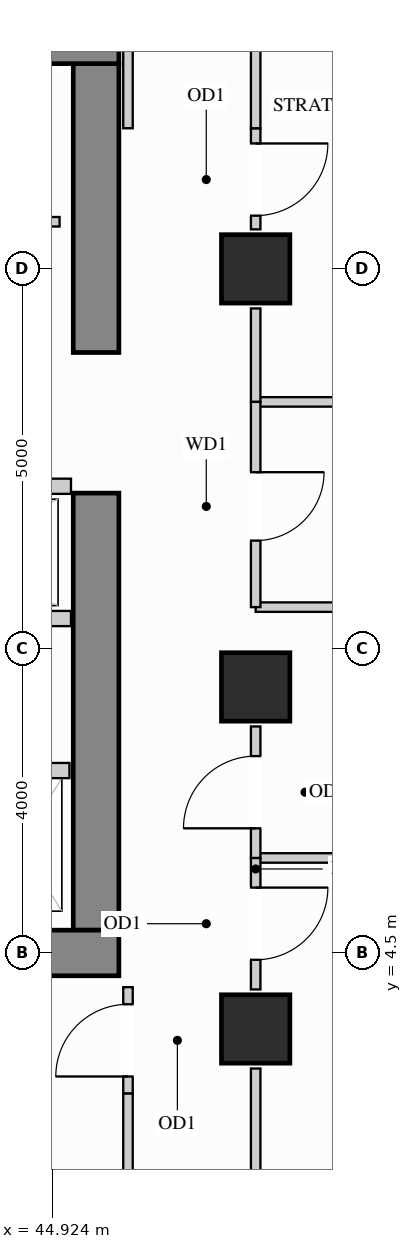
"""IFC4 building model, lengths in metres.
Left out: names, types, materials, properties, quantities, classifications, styles, units other than length and angle.
Written with IfcOpenShell. Run it as: python <this file> out.ifc"""

import sys

from ifc_helpers import new_model, si_unit, direction, frame, frame_2d, origin, origin_2d, place, context, subcontext, project, spatial, rectangle, extrude, source, transform, mapped, element, fill, save


model = new_model("IFC4")
c1 = context("Model", 3, precision=1e-05, world=origin(), true_north=direction((0.0, 1.0)))
c2 = subcontext(c1, "Body", "Model", "MODEL_VIEW")
j1 = project(units=[si_unit("LENGTHUNIT", "METRE"), si_unit("PLANEANGLEUNIT", "RADIAN")], contexts=[c1])
p1 = place(None, origin())
s1 = spatial("IfcSite", under=j1, at=p1, CompositionType="ELEMENT")
p2 = place(p1, origin())
s2 = spatial("IfcBuilding", under=s1, at=p2, CompositionType="ELEMENT")
p3 = place(p2, frame((0.0, 0.0, 179.1)))
s3 = spatial("IfcBuildingStorey", under=s2, at=p3, CompositionType="ELEMENT", Elevation=179.1)
m1 = source(origin(), c2, "Body", "SweptSolid", [
    extrude(rectangle(XDim=0.9, YDim=0.9, at=origin_2d()), origin(), (0.0, 0.0, 1.0), 3.4),
])
for number, where, z_axis, x_axis in (
    (1, (47.6, 13.5, 0.0), (0.0, 0.0, 1.0), (1.0, 0.0, 0.0)),
    (2, (47.6, 3.5, 0.0), (0.0, 0.0, 1.0), (1.0, 0.0, 0.0)),
    (3, (47.6, 8.0, 0.0), (0.0, 0.0, 1.0), (1.0, 0.0, 0.0)),
):
    element("IfcColumn", number, at=place(p3, frame(where, z_axis=z_axis, x_axis=x_axis)), inside=s3, PredefinedType="COLUMN", context=c2, shape_type="MappedRepresentation", body=[
        mapped(m1, transform((0.0, 0.0, 0.0), x_axis=(1.0, 0.0, 0.0), y_axis=(0.0, 1.0, 0.0), z_axis=(0.0, 0.0, 1.0))),
    ])
m2 = source(origin(), c2, "Body", "SweptSolid", [
    extrude(rectangle(XDim=5.75, YDim=0.6, at=frame_2d((2.875, 0.0))), origin(), (0.0, 0.0, 1.0), 3.4),
])
p4 = place(p3, frame((45.5, 4.8, 0.0), z_axis=(0.0, 0.0, 1.0), x_axis=(0.0, 1.0, 0.0)))
e4 = element("IfcWall", 4, at=p4, inside=s3, PredefinedType="SHEAR", context=c2, shape_type="MappedRepresentation", body=[
    mapped(m2, transform((0.0, 0.0, 0.0), x_axis=(1.0, 0.0, 0.0), y_axis=(0.0, 1.0, 0.0), z_axis=(0.0, 0.0, 1.0))),
])
m3 = source(origin(), c2, "Body", "SweptSolid", [
    extrude(rectangle(XDim=3.8, YDim=0.6, at=frame_2d((1.9, 0.0))), origin(), (0.0, 0.0, 1.0), 3.4),
])
p5 = place(p3, frame((45.5, 12.4, 0.0), z_axis=(0.0, 0.0, 1.0), x_axis=(0.0, 1.0, 0.0)))
e5 = element("IfcWall", 5, at=p5, inside=s3, PredefinedType="SHEAR", context=c2, shape_type="MappedRepresentation", body=[
    mapped(m3, transform((0.0, 0.0, 0.0), x_axis=(1.0, 0.0, 0.0), y_axis=(0.0, 1.0, 0.0), z_axis=(0.0, 0.0, 1.0))),
])
m4 = source(origin(), c2, "Body", "SweptSolid", [
    extrude(rectangle(XDim=10.1, YDim=0.6, at=frame_2d((5.05, 0.0))), origin(), (0.0, 0.0, 1.0), 3.4),
])
for number, where, z_axis, x_axis in (
    (6, (35.7, 16.5, 0.0), (0.0, 0.0, 1.0), (1.0, 0.0, 0.0)),
    (7, (35.7, 4.5, 0.0), (0.0, 0.0, 1.0), (1.0, 0.0, 0.0)),
):
    element("IfcWall", number, at=place(p3, frame(where, z_axis=z_axis, x_axis=x_axis)), inside=s3, PredefinedType="SHEAR", context=c2, shape_type="MappedRepresentation", body=[
        mapped(m4, transform((0.0, 0.0, 0.0), x_axis=(1.0, 0.0, 0.0), y_axis=(0.0, 1.0, 0.0), z_axis=(0.0, 0.0, 1.0))),
    ])
p6 = place(p3, frame((36.5, 14.12, 0.0), z_axis=(0.0, 0.0, 1.0), x_axis=(1.0, 0.0, 0.0)))
e8 = element("IfcWall", 8, at=p6, inside=s3, PredefinedType="PARTITIONING", context=c2, shape_type="SweptSolid", body=[
    extrude(rectangle(XDim=8.52, YDim=0.125, at=frame_2d((4.26, 0.0))), origin(), (0.0, 0.0, 1.0), 3.385),
])
p7 = place(p6, frame((3.785, 0.0, 0.0)))
e9 = element("IfcOpeningElement", 9, at=p7, cuts=e8, PredefinedType="OPENING", context=c2, shape_type="SweptSolid", body=[
    extrude(rectangle(XDim=0.95, YDim=2.15, at=frame_2d((0.475, 1.075))), frame((0.0, 0.073, 0.0), z_axis=(0.0, -1.0, 0.0), x_axis=(1.0, 0.0, 0.0)), (0.0, 0.0, 1.0), 0.145),
])
m5 = source(origin(), c2, "Body", "SweptSolid", [
    extrude(rectangle(XDim=5.048, YDim=0.125, at=frame_2d((2.524, 0.0))), origin(), (0.0, 0.0, 1.0), 2.916),
])
p8 = place(p3, frame((47.6, 11.75, 0.0), z_axis=(0.0, 0.0, 1.0), x_axis=(1.0, 0.0, 0.0)))
e10 = element("IfcWall", 10, at=p8, inside=s3, PredefinedType="PARTITIONING", context=c2, shape_type="MappedRepresentation", body=[
    mapped(m5, transform((0.0, 0.0, 0.0), x_axis=(1.0, 0.0, 0.0), y_axis=(0.0, 1.0, 0.0), z_axis=(0.0, 0.0, 1.0))),
])
m6 = source(origin(), c2, "Body", "SweptSolid", [
    extrude(rectangle(XDim=5.048, YDim=0.125, at=frame_2d((2.524, 0.0))), origin(), (0.0, 0.0, 1.0), 3.385),
])
for number, where, z_axis, x_axis in (
    (11, (47.6, 5.75, 0.0), (0.0, 0.0, 1.0), (1.0, 0.0, 0.0)),
    (12, (47.6, 9.05, 0.0), (0.0, 0.0, 1.0), (1.0, 0.0, 0.0)),
):
    element("IfcWall", number, at=place(p3, frame(where, z_axis=z_axis, x_axis=x_axis)), inside=s3, PredefinedType="PARTITIONING", context=c2, shape_type="MappedRepresentation", body=[
        mapped(m6, transform((0.0, 0.0, 0.0), x_axis=(1.0, 0.0, 0.0), y_axis=(0.0, 1.0, 0.0), z_axis=(0.0, 0.0, 1.0))),
    ])
p9 = place(p3, frame((47.6, 4.02, 0.0), z_axis=(0.0, 0.0, 1.0), x_axis=(0.0, 1.0, 0.0)))
e13 = element("IfcWall", 13, at=p9, inside=s3, PredefinedType="PARTITIONING", context=c2, shape_type="SweptSolid", body=[
    extrude(rectangle(XDim=1.73, YDim=0.125, at=frame_2d((0.865, 0.0))), origin(), (0.0, 0.0, 1.0), 2.773),
])
p10 = place(p9, frame((0.39, 0.0, 0.0)))
e14 = element("IfcOpeningElement", 14, at=p10, cuts=e13, PredefinedType="OPENING", context=c2, shape_type="SweptSolid", body=[
    extrude(rectangle(XDim=0.95, YDim=2.15, at=frame_2d((0.475, 1.075))), frame((0.0, 0.073, 0.0), z_axis=(0.0, -1.0, 0.0), x_axis=(1.0, 0.0, 0.0)), (0.0, 0.0, 1.0), 0.145),
])
m7 = source(origin(), c2, "Body", "SweptSolid", [
    extrude(rectangle(XDim=1.86, YDim=0.125, at=frame_2d((0.93, 0.0))), origin(), (0.0, 0.0, 1.0), 2.773),
])
p11 = place(p3, frame((47.6, 1.12, 0.0), z_axis=(0.0, 0.0, 1.0), x_axis=(0.0, 1.0, 0.0)))
e15 = element("IfcWall", 15, at=p11, inside=s3, PredefinedType="PARTITIONING", context=c2, shape_type="MappedRepresentation", body=[
    mapped(m7, transform((0.0, 0.0, 0.0), x_axis=(1.0, 0.0, 0.0), y_axis=(0.0, 1.0, 0.0), z_axis=(0.0, 0.0, 1.0))),
])
p12 = place(p3, frame((47.6, 5.75, 0.0), z_axis=(0.0, 0.0, 1.0), x_axis=(0.0, 1.0, 0.0)))
e16 = element("IfcWall", 16, at=p12, inside=s3, PredefinedType="PARTITIONING", context=c2, shape_type="SweptSolid", body=[
    extrude(rectangle(XDim=1.73, YDim=0.125, at=frame_2d((0.865, 0.0))), origin(), (0.0, 0.0, 1.0), 2.773),
])
p13 = place(p12, frame((0.39, 0.0, 0.0)))
e17 = element("IfcOpeningElement", 17, at=p13, cuts=e16, PredefinedType="OPENING", context=c2, shape_type="SweptSolid", body=[
    extrude(rectangle(XDim=0.95, YDim=2.15, at=frame_2d((0.475, 1.075))), frame((0.0, 0.073, 0.0), z_axis=(0.0, -1.0, 0.0), x_axis=(1.0, 0.0, 0.0)), (0.0, 0.0, 1.0), 0.145),
])
m8 = source(origin(), c2, "Body", "SweptSolid", [
    extrude(rectangle(XDim=1.23, YDim=0.125, at=frame_2d((0.615, 0.0))), origin(), (0.0, 0.0, 1.0), 2.773),
])
p14 = place(p3, frame((47.6, 11.75, 0.0), z_axis=(0.0, 0.0, 1.0), x_axis=(0.0, 1.0, 0.0)))
e18 = element("IfcWall", 18, at=p14, inside=s3, PredefinedType="PARTITIONING", context=c2, shape_type="MappedRepresentation", body=[
    mapped(m8, transform((0.0, 0.0, 0.0), x_axis=(1.0, 0.0, 0.0), y_axis=(0.0, 1.0, 0.0), z_axis=(0.0, 0.0, 1.0))),
])
p15 = place(p3, frame((47.6, 14.02, 0.0), z_axis=(0.0, 0.0, 1.0), x_axis=(0.0, 1.0, 0.0)))
e19 = element("IfcWall", 19, at=p15, inside=s3, PredefinedType="PARTITIONING", context=c2, shape_type="SweptSolid", body=[
    extrude(rectangle(XDim=1.33, YDim=0.125, at=frame_2d((0.665, 0.0))), origin(), (0.0, 0.0, 1.0), 2.773),
])
p16 = place(p15, frame((0.18, 0.0, 0.0)))
e20 = element("IfcOpeningElement", 20, at=p16, cuts=e19, PredefinedType="OPENING", context=c2, shape_type="SweptSolid", body=[
    extrude(rectangle(XDim=0.95, YDim=2.15, at=frame_2d((0.475, 1.075))), frame((0.0, 0.073, 0.0), z_axis=(0.0, -1.0, 0.0), x_axis=(1.0, 0.0, 0.0)), (0.0, 0.0, 1.0), 0.145),
])
m9 = source(origin(), c2, "Body", "SweptSolid", [
    extrude(rectangle(XDim=1.53, YDim=0.125, at=frame_2d((0.765, 0.0))), origin(), (0.0, 0.0, 1.0), 2.773),
])
p17 = place(p3, frame((47.6, 15.35, 0.0), z_axis=(0.0, 0.0, 1.0), x_axis=(0.0, 1.0, 0.0)))
e21 = element("IfcWall", 21, at=p17, inside=s3, PredefinedType="PARTITIONING", context=c2, shape_type="MappedRepresentation", body=[
    mapped(m9, transform((0.0, 0.0, 0.0), x_axis=(1.0, 0.0, 0.0), y_axis=(0.0, 1.0, 0.0), z_axis=(0.0, 0.0, 1.0))),
])
p18 = place(p3, frame((47.6, 9.05, 0.0), z_axis=(0.0, 0.0, 1.0), x_axis=(0.0, 1.0, 0.0)))
e22 = element("IfcWall", 22, at=p18, inside=s3, PredefinedType="PARTITIONING", context=c2, shape_type="SweptSolid", body=[
    extrude(rectangle(XDim=2.7, YDim=0.125, at=frame_2d((1.35, 0.0))), origin(), (0.0, 0.0, 1.0), 2.773),
])
p19 = place(p18, frame((0.875, 0.0, 0.0)))
e23 = element("IfcOpeningElement", 23, at=p19, cuts=e22, PredefinedType="OPENING", context=c2, shape_type="SweptSolid", body=[
    extrude(rectangle(XDim=0.9, YDim=2.15, at=frame_2d((0.45, 1.075))), frame((0.0, 0.073, 0.0), z_axis=(0.0, -1.0, 0.0), x_axis=(1.0, 0.0, 0.0)), (0.0, 0.0, 1.0), 0.145),
])
m10 = source(origin(), c2, "Body", "SweptSolid", [
    extrude(rectangle(XDim=2.298, YDim=0.125, at=frame_2d((1.149, 0.0))), origin(), (0.0, 0.0, 1.0), 3.385),
])
p20 = place(p3, frame((45.92, 15.35, 0.0), z_axis=(0.0, 0.0, 1.0), x_axis=(0.0, 1.0, 0.0)))
e24 = element("IfcWall", 24, at=p20, inside=s3, PredefinedType="PARTITIONING", context=c2, shape_type="MappedRepresentation", body=[
    mapped(m10, transform((0.0, 0.0, 0.0), x_axis=(1.0, 0.0, 0.0), y_axis=(0.0, 1.0, 0.0), z_axis=(0.0, 0.0, 1.0))),
])
p21 = place(p3, frame((45.92, 2.65, 0.0), z_axis=(0.0, 0.0, 1.0), x_axis=(0.0, 1.0, 0.0)))
e25 = element("IfcWall", 25, at=p21, inside=s3, PredefinedType="PARTITIONING", context=c2, shape_type="SweptSolid", body=[
    extrude(rectangle(XDim=1.4, YDim=0.125, at=frame_2d((0.7, 0.0))), origin(), (0.0, 0.0, 1.0), 3.385),
])
p22 = place(p21, frame((0.225, 0.0, 0.0)))
e26 = element("IfcOpeningElement", 26, at=p22, cuts=e25, PredefinedType="OPENING", context=c2, shape_type="SweptSolid", body=[
    extrude(rectangle(XDim=0.95, YDim=2.15, at=frame_2d((0.475, 1.075))), frame((0.0, 0.073, 0.0), z_axis=(0.0, -1.0, 0.0), x_axis=(1.0, 0.0, 0.0)), (0.0, 0.0, 1.0), 0.145),
])
p23 = place(p3, frame((45.92, 0.352, 0.0), z_axis=(0.0, 0.0, 1.0), x_axis=(0.0, 1.0, 0.0)))
e27 = element("IfcWall", 27, at=p23, inside=s3, PredefinedType="PARTITIONING", context=c2, shape_type="MappedRepresentation", body=[
    mapped(m10, transform((0.0, 0.0, 0.0), x_axis=(1.0, 0.0, 0.0), y_axis=(0.0, 1.0, 0.0), z_axis=(0.0, 0.0, 1.0))),
])
m11 = source(origin(), c2, "Body", "SweptSolid", [
    extrude(rectangle(XDim=1.3, YDim=0.2, at=frame_2d((0.65, 0.0))), origin(), (0.0, 0.0, 1.0), 3.385),
])
p24 = place(p3, frame((43.85, 6.9, 0.0), z_axis=(0.0, 0.0, 1.0), x_axis=(1.0, 0.0, 0.0)))
e28 = element("IfcWall", 28, at=p24, inside=s3, PredefinedType="PARTITIONING", context=c2, shape_type="MappedRepresentation", body=[
    mapped(m11, transform((0.0, 0.0, 0.0), x_axis=(1.0, 0.0, 0.0), y_axis=(0.0, 1.0, 0.0), z_axis=(0.0, 0.0, 1.0))),
])
m12 = source(origin(), c2, "Body", "SweptSolid", [
    extrude(rectangle(XDim=3.49, YDim=0.2, at=frame_2d((1.745, 0.0))), origin(), (0.0, 0.0, 1.0), 3.385),
])
for number, where, z_axis, x_axis in (
    (29, (41.68, 10.64, 0.0), (0.0, 0.0, 1.0), (1.0, 0.0, 0.0)),
    (30, (41.68, 8.9, 0.0), (0.0, 0.0, 1.0), (1.0, 0.0, 0.0)),
):
    element("IfcWall", number, at=place(p3, frame(where, z_axis=z_axis, x_axis=x_axis)), inside=s3, PredefinedType="PARTITIONING", context=c2, shape_type="MappedRepresentation", body=[
        mapped(m12, transform((0.0, 0.0, 0.0), x_axis=(1.0, 0.0, 0.0), y_axis=(0.0, 1.0, 0.0), z_axis=(0.0, 0.0, 1.0))),
    ])
m13 = source(origin(), c2, "Body", "SweptSolid", [
    extrude(rectangle(XDim=0.95, YDim=2.15, at=frame_2d((0.475, 1.075))), frame((0.0, 0.025, 0.0), z_axis=(0.0, -1.0, 0.0), x_axis=(1.0, 0.0, 0.0)), (0.0, 0.0, 1.0), 0.05),
])
p25 = place(p22, origin())
e31 = element("IfcDoor", 31, at=p25, inside=s3, OperationType="SINGLE_SWING_LEFT", PredefinedType="DOOR", context=c2, shape_type="MappedRepresentation", body=[
    mapped(m13, transform((0.0, 0.0, 0.0), x_axis=(1.0, 0.0, 0.0), y_axis=(0.0, 1.0, 0.0), z_axis=(0.0, 0.0, 1.0))),
])
fill(e26, e31)
p26 = place(p10, origin())
e32 = element("IfcDoor", 32, at=p26, inside=s3, OperationType="SINGLE_SWING_RIGHT", PredefinedType="DOOR", context=c2, shape_type="MappedRepresentation", body=[
    mapped(m13, transform((0.0, 0.0, 0.0), x_axis=(1.0, 0.0, 0.0), y_axis=(0.0, 1.0, 0.0), z_axis=(0.0, 0.0, 1.0))),
])
fill(e14, e32)
p27 = place(p13, origin())
e33 = element("IfcDoor", 33, at=p27, inside=s3, OperationType="SINGLE_SWING_LEFT", PredefinedType="DOOR", context=c2, shape_type="MappedRepresentation", body=[
    mapped(m13, transform((0.0, 0.0, 0.0), x_axis=(1.0, 0.0, 0.0), y_axis=(0.0, 1.0, 0.0), z_axis=(0.0, 0.0, 1.0))),
])
fill(e17, e33)
p28 = place(p16, origin())
e34 = element("IfcDoor", 34, at=p28, inside=s3, OperationType="SINGLE_SWING_RIGHT", PredefinedType="DOOR", context=c2, shape_type="MappedRepresentation", body=[
    mapped(m13, transform((0.0, 0.0, 0.0), x_axis=(1.0, 0.0, 0.0), y_axis=(0.0, 1.0, 0.0), z_axis=(0.0, 0.0, 1.0))),
])
fill(e20, e34)
m14 = source(origin(), c2, "Body", "SweptSolid", [
    extrude(rectangle(XDim=0.9, YDim=2.15, at=frame_2d((0.45, 1.075))), frame((0.0, 0.025, 0.0), z_axis=(0.0, -1.0, 0.0), x_axis=(1.0, 0.0, 0.0)), (0.0, 0.0, 1.0), 0.05),
])
p29 = place(p19, origin())
e35 = element("IfcDoor", 35, at=p29, inside=s3, OperationType="SINGLE_SWING_RIGHT", PredefinedType="DOOR", context=c2, shape_type="MappedRepresentation", body=[
    mapped(m14, transform((0.0, 0.0, 0.0), x_axis=(1.0, 0.0, 0.0), y_axis=(0.0, 1.0, 0.0), z_axis=(0.0, 0.0, 1.0))),
])
fill(e23, e35)
save(model, sys.argv[1])
